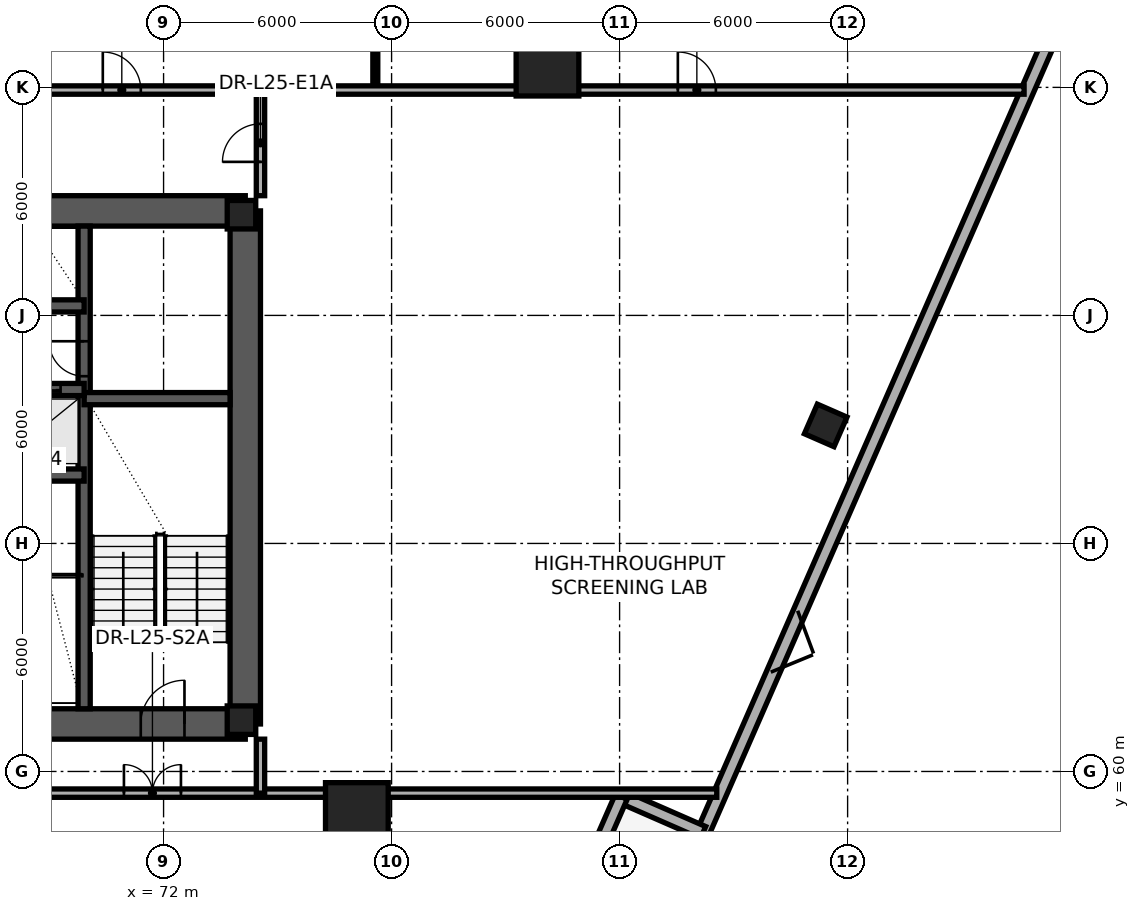
"""IFC4 building model, lengths in metres.
Left out: names, types, materials, properties, quantities, classifications, styles, units other than length and angle.
Written with IfcOpenShell. Run it as: python <this file> out.ifc"""

import sys

from ifc_helpers import new_model, si_unit, direction, frame, frame_2d, origin, origin_2d, place, context, subcontext, project, spatial, rectangle, extrude, element, fill, save


model = new_model("IFC4")
c1 = context("Model", 3, precision=1e-05, world=origin(), true_north=direction((0.0, 1.0)))
c2 = subcontext(c1, "Body", "Model", "MODEL_VIEW")
j1 = project(units=[si_unit("LENGTHUNIT", "METRE"), si_unit("PLANEANGLEUNIT", "RADIAN")], contexts=[c1])
p1 = place(None, origin())
s1 = spatial("IfcSite", under=j1, at=p1, CompositionType="ELEMENT")
p2 = place(p1, origin())
s2 = spatial("IfcBuilding", under=s1, at=p2, CompositionType="ELEMENT")
p3 = place(p2, frame((0.0, 0.0, 96.9)))
s3 = spatial("IfcBuildingStorey", under=s2, at=p3, CompositionType="ELEMENT", Elevation=96.9)
p4 = place(p3, frame((57.85, 61.25, 0.0), z_axis=(0.0, 0.0, 1.0), x_axis=(1.0, 0.0, 0.0)))
e1 = element("IfcWall", 1, at=p4, inside=s3, PredefinedType="SHEAR", context=c2, shape_type="SweptSolid", body=[
    extrude(rectangle(XDim=16.3, YDim=0.8, at=frame_2d((8.15, 0.0))), origin(), (0.0, 0.0, 1.0), 3.65),
])
p5 = place(p4, frame((1.35, 0.0, 0.0)))
e2 = element("IfcOpeningElement", 2, at=p5, cuts=e1, PredefinedType="OPENING", context=c2, shape_type="SweptSolid", body=[
    extrude(rectangle(XDim=1.15, YDim=2.15, at=frame_2d((0.575, 1.075))), frame((0.0, 0.41, 0.0), z_axis=(0.0, -1.0, 0.0), x_axis=(1.0, 0.0, 0.0)), (0.0, 0.0, 1.0), 0.82),
])
p6 = place(p4, frame((6.1, 0.0, 0.0)))
e3 = element("IfcOpeningElement", 3, at=p6, cuts=e1, PredefinedType="OPENING", context=c2, shape_type="SweptSolid", body=[
    extrude(rectangle(XDim=1.6, YDim=2.15, at=frame_2d((0.8, 1.075))), frame((0.0, 0.41, 0.0), z_axis=(0.0, -1.0, 0.0), x_axis=(1.0, 0.0, 0.0)), (0.0, 0.0, 1.0), 0.82),
])
p7 = place(p4, frame((13.55, 0.0, 0.0)))
e4 = element("IfcOpeningElement", 4, at=p7, cuts=e1, PredefinedType="OPENING", context=c2, shape_type="SweptSolid", body=[
    extrude(rectangle(XDim=1.15, YDim=2.15, at=frame_2d((0.575, 1.075))), frame((0.0, 0.41, 0.0), z_axis=(0.0, -1.0, 0.0), x_axis=(1.0, 0.0, 0.0)), (0.0, 0.0, 1.0), 0.82),
])
p8 = place(p3, frame((74.15, 61.25, 0.0), z_axis=(0.0, 0.0, 1.0), x_axis=(0.0, 1.0, 0.0)))
e5 = element("IfcWall", 5, at=p8, inside=s3, PredefinedType="SHEAR", context=c2, shape_type="SweptSolid", body=[
    extrude(rectangle(XDim=13.5, YDim=0.8, at=frame_2d((6.75, 0.0))), origin(), (0.0, 0.0, 1.0), 3.65),
])
p9 = place(p3, frame((74.15, 74.75, 0.0), z_axis=(0.0, 0.0, 1.0), x_axis=(-1.0, 0.0, 0.0)))
e6 = element("IfcWall", 6, at=p9, inside=s3, PredefinedType="SHEAR", context=c2, shape_type="SweptSolid", body=[
    extrude(rectangle(XDim=7.3, YDim=0.8, at=frame_2d((3.65, 0.0))), origin(), (0.0, 0.0, 1.0), 3.65),
])
p10 = place(p3, frame((69.91, 61.65, 0.0), z_axis=(0.0, 0.0, 1.0), x_axis=(0.0, 1.0, 0.0)))
e7 = element("IfcWall", 7, at=p10, inside=s3, PredefinedType="SHEAR", context=c2, shape_type="SweptSolid", body=[
    extrude(rectangle(XDim=12.7, YDim=0.32, at=frame_2d((6.35, 0.0))), origin(), (0.0, 0.0, 1.0), 3.65),
])
p11 = place(p10, frame((8.75, 0.0, 0.0)))
e8 = element("IfcOpeningElement", 8, at=p11, cuts=e7, PredefinedType="OPENING", context=c2, shape_type="SweptSolid", body=[
    extrude(rectangle(XDim=0.92, YDim=2.05, at=frame_2d((0.46, 1.025))), frame((0.0, 0.17, 0.0), z_axis=(0.0, -1.0, 0.0), x_axis=(1.0, 0.0, 0.0)), (0.0, 0.0, 1.0), 0.34),
])
p12 = place(p3, frame((69.91, 69.81, 0.0), z_axis=(0.0, 0.0, 1.0), x_axis=(1.0, 0.0, 0.0)))
e9 = element("IfcWall", 9, at=p12, inside=s3, PredefinedType="SHEAR", context=c2, shape_type="SweptSolid", body=[
    extrude(rectangle(XDim=3.84, YDim=0.32, at=frame_2d((1.92, 0.0))), origin(), (0.0, 0.0, 1.0), 3.65),
])
p13 = place(p3, frame((62.09, 67.8, 0.0), z_axis=(0.0, 0.0, 1.0), x_axis=(1.0, 0.0, 0.0)))
e10 = element("IfcWall", 10, at=p13, inside=s3, PredefinedType="SHEAR", context=c2, shape_type="SweptSolid", body=[
    extrude(rectangle(XDim=7.82, YDim=0.32, at=frame_2d((3.91, 0.0))), origin(), (0.0, 0.0, 1.0), 3.65),
])
p14 = place(p3, frame((62.09, 70.05, 0.0), z_axis=(0.0, 0.0, 1.0), x_axis=(1.0, 0.0, 0.0)))
e11 = element("IfcWall", 11, at=p14, inside=s3, PredefinedType="SHEAR", context=c2, shape_type="SweptSolid", body=[
    extrude(rectangle(XDim=7.82, YDim=0.32, at=frame_2d((3.91, 0.0))), origin(), (0.0, 0.0, 1.0), 3.65),
])
p15 = place(p14, frame((1.8, 0.0, 0.0)))
e12 = element("IfcOpeningElement", 12, at=p15, cuts=e11, PredefinedType="OPENING", context=c2, shape_type="SweptSolid", body=[
    extrude(rectangle(XDim=1.05, YDim=2.15, at=frame_2d((0.525, 1.075))), frame((0.0, 0.17, 0.0), z_axis=(0.0, -1.0, 0.0), x_axis=(1.0, 0.0, 0.0)), (0.0, 0.0, 1.0), 0.34),
])
p16 = place(p14, frame((6.1, 0.0, 0.0)))
e13 = element("IfcOpeningElement", 13, at=p16, cuts=e11, PredefinedType="OPENING", context=c2, shape_type="SweptSolid", body=[
    extrude(rectangle(XDim=1.1, YDim=2.2, at=frame_2d((0.55, 1.1))), frame((0.0, 0.17, 0.0), z_axis=(0.0, -1.0, 0.0), x_axis=(1.0, 0.0, 0.0)), (0.0, 0.0, 1.0), 0.34),
])
p17 = place(p3, frame((66.85, 72.25, 0.0), z_axis=(0.0, 0.0, 1.0), x_axis=(1.0, 0.0, 0.0)))
e14 = element("IfcWall", 14, at=p17, inside=s3, PredefinedType="SHEAR", context=c2, shape_type="SweptSolid", body=[
    extrude(rectangle(XDim=3.06, YDim=0.32, at=frame_2d((1.53, 0.0))), origin(), (0.0, 0.0, 1.0), 3.65),
])
for number, where, z_axis, x_axis in (
    (15, (74.05, 61.35, 0.0), (0.0, 0.0, 1.0), (1.0, 0.0, 0.0)),
    (16, (74.05, 74.65, 0.0), (0.0, 0.0, 1.0), (1.0, 0.0, 0.0)),
):
    element("IfcColumn", number, at=place(p3, frame(where, z_axis=z_axis, x_axis=x_axis)), inside=s3, PredefinedType="COLUMN", context=c2, shape_type="SweptSolid", body=[
        extrude(rectangle(XDim=0.75, YDim=0.75, at=origin_2d()), origin(), (0.0, 0.0, 1.0), 3.65),
    ])
for number, where, z_axis, x_axis in (
    (17, (82.102, 78.599, 0.0), (0.0, 0.0, 1.0), (1.0, 0.0, 0.0)),
    (18, (77.086, 58.88, 0.0), (0.0, 0.0, 1.0), (1.0, 0.0, 0.0)),
):
    element("IfcColumn", number, at=place(p3, frame(where, z_axis=z_axis, x_axis=x_axis)), inside=s3, PredefinedType="COLUMN", context=c2, shape_type="SweptSolid", body=[
        extrude(rectangle(XDim=1.65, YDim=1.65, at=origin_2d()), origin(), (0.0, 0.0, 1.0), 3.65),
    ])
p18 = place(p3, frame((89.494, 69.115, 0.003), z_axis=(-0.039229493406, -0.00569028488, 0.999214024874), x_axis=(0.963587524212, -0.264914672989, 0.036322158782)))
e19 = element("IfcColumn", 19, at=p18, inside=s3, PredefinedType="COLUMN", context=c2, shape_type="SweptSolid", body=[
    extrude(rectangle(XDim=0.85, YDim=0.85, at=origin_2d()), origin(), (0.0, 0.0, 1.0), 3.647),
])
p19 = place(p3, frame((96.984, 83.071, 0.0), z_axis=(0.0, 0.0, 1.0), x_axis=(-0.400539645754, -0.916279429093, 0.0)))
e20 = element("IfcWall", 20, at=p19, inside=s3, PredefinedType="STANDARD", context=c2, shape_type="SweptSolid", body=[
    extrude(rectangle(XDim=26.93, YDim=0.34, at=frame_2d((13.465, 0.0))), origin(), (0.0, 0.0, 1.0), 0.85),
])
p20 = place(p3, frame((86.198, 58.396, 0.0), z_axis=(0.0, 0.0, 1.0), x_axis=(-0.916262209943, 0.400579034188, 0.0)))
e21 = element("IfcWall", 21, at=p20, inside=s3, PredefinedType="STANDARD", context=c2, shape_type="SweptSolid", body=[
    extrude(rectangle(XDim=2.35, YDim=0.34, at=frame_2d((1.175, 0.0))), origin(), (0.0, 0.0, 1.0), 2.505),
])
p21 = place(p3, frame((84.044, 59.337, 0.0), z_axis=(0.0, 0.0, 1.0), x_axis=(-0.400536170639, -0.916280948187, 0.0)))
e22 = element("IfcWall", 22, at=p21, inside=s3, PredefinedType="STANDARD", context=c2, shape_type="SweptSolid", body=[
    extrude(rectangle(XDim=11.6, YDim=0.34, at=frame_2d((5.8, 0.0))), origin(), (0.0, 0.0, 1.0), 2.855),
])
p22 = place(p21, frame((9.05, 0.0, 0.0)))
e23 = element("IfcOpeningElement", 23, at=p22, cuts=e22, PredefinedType="OPENING", context=c2, shape_type="SweptSolid", body=[
    extrude(rectangle(XDim=1.9, YDim=2.3, at=frame_2d((0.95, 1.15))), frame((0.0, 0.18, 0.0), z_axis=(0.0, -1.0, 0.0), x_axis=(1.0, 0.0, 0.0)), (0.0, 0.0, 1.0), 0.36),
])
p23 = place(p3, frame((77.572, 77.93, 0.0), z_axis=(0.0, 0.0, 1.0), x_axis=(0.0, 1.0, 0.0)))
e24 = element("IfcWall", 24, at=p23, inside=s3, PredefinedType="PARTITIONING", context=c2, shape_type="SweptSolid", body=[
    extrude(rectangle(XDim=12.339, YDim=0.13, at=frame_2d((6.169, 0.0))), origin(), (0.0, 0.0, 1.0), 2.505),
])
p24 = place(p3, frame((37.356, 77.93, 0.0), z_axis=(0.0, 0.0, 1.0), x_axis=(1.0, 0.0, 0.0)))
e25 = element("IfcWall", 25, at=p24, inside=s3, PredefinedType="PARTITIONING", context=c2, shape_type="SweptSolid", body=[
    extrude(rectangle(XDim=57.288, YDim=0.22, at=frame_2d((28.644, 0.0))), origin(), (0.0, 0.0, 1.0), 2.505),
])
p25 = place(p24, frame((22.204, 0.0, 0.0)))
e26 = element("IfcOpeningElement", 26, at=p25, cuts=e25, PredefinedType="OPENING", context=c2, shape_type="SweptSolid", body=[
    extrude(rectangle(XDim=0.98, YDim=2.1, at=frame_2d((0.49, 1.05))), frame((0.0, 0.12, 0.0), z_axis=(0.0, -1.0, 0.0), x_axis=(1.0, 0.0, 0.0)), (0.0, 0.0, 1.0), 0.24),
])
p26 = place(p24, frame((25.029, 0.0, 0.0)))
e27 = element("IfcOpeningElement", 27, at=p26, cuts=e25, PredefinedType="OPENING", context=c2, shape_type="SweptSolid", body=[
    extrude(rectangle(XDim=0.98, YDim=2.1, at=frame_2d((0.49, 1.05))), frame((0.0, 0.12, 0.0), z_axis=(0.0, -1.0, 0.0), x_axis=(1.0, 0.0, 0.0)), (0.0, 0.0, 1.0), 0.24),
])
p27 = place(p24, frame((9.311, 0.0, 0.0)))
e28 = element("IfcOpeningElement", 28, at=p27, cuts=e25, PredefinedType="OPENING", context=c2, shape_type="SweptSolid", body=[
    extrude(rectangle(XDim=1.0, YDim=2.1, at=frame_2d((0.5, 1.05))), frame((0.0, 0.12, 0.0), z_axis=(0.0, -1.0, 0.0), x_axis=(1.0, 0.0, 0.0)), (0.0, 0.0, 1.0), 0.24),
])
p28 = place(p24, frame((33.045, 0.0, 0.0)))
e29 = element("IfcOpeningElement", 29, at=p28, cuts=e25, PredefinedType="OPENING", context=c2, shape_type="SweptSolid", body=[
    extrude(rectangle(XDim=1.0, YDim=2.1, at=frame_2d((0.5, 1.05))), frame((0.0, 0.12, 0.0), z_axis=(0.0, -1.0, 0.0), x_axis=(1.0, 0.0, 0.0)), (0.0, 0.0, 1.0), 0.24),
])
p29 = place(p24, frame((48.177, 0.0, 0.0)))
e30 = element("IfcOpeningElement", 30, at=p29, cuts=e25, PredefinedType="OPENING", context=c2, shape_type="SweptSolid", body=[
    extrude(rectangle(XDim=1.0, YDim=2.1, at=frame_2d((0.5, 1.05))), frame((0.0, 0.12, 0.0), z_axis=(0.0, -1.0, 0.0), x_axis=(1.0, 0.0, 0.0)), (0.0, 0.0, 1.0), 0.24),
])
p30 = place(p3, frame((45.443, 59.43, 0.0), z_axis=(0.0, 0.0, 1.0), x_axis=(1.0, 0.0, 0.0)))
e31 = element("IfcWall", 31, at=p30, inside=s3, PredefinedType="PARTITIONING", context=c2, shape_type="SweptSolid", body=[
    extrude(rectangle(XDim=41.114, YDim=0.22, at=frame_2d((20.557, 0.0))), origin(), (0.0, 0.0, 1.0), 2.505),
])
p31 = place(p30, frame((6.376, 0.0, 0.0)))
e32 = element("IfcOpeningElement", 32, at=p31, cuts=e31, PredefinedType="OPENING", context=c2, shape_type="SweptSolid", body=[
    extrude(rectangle(XDim=1.5, YDim=2.2, at=frame_2d((0.75, 1.1))), frame((0.0, 0.12, 0.0), z_axis=(0.0, -1.0, 0.0), x_axis=(1.0, 0.0, 0.0)), (0.0, 0.0, 1.0), 0.24),
])
p32 = place(p30, frame((25.514, 0.0, 0.0)))
e33 = element("IfcOpeningElement", 33, at=p32, cuts=e31, PredefinedType="OPENING", context=c2, shape_type="SweptSolid", body=[
    extrude(rectangle(XDim=1.5, YDim=2.2, at=frame_2d((0.75, 1.1))), frame((0.0, 0.12, 0.0), z_axis=(0.0, -1.0, 0.0), x_axis=(1.0, 0.0, 0.0)), (0.0, 0.0, 1.0), 0.24),
])
p33 = place(p3, frame((74.55, 75.15, 0.0), z_axis=(0.0, 0.0, 1.0), x_axis=(0.0, 1.0, 0.0)))
e34 = element("IfcWall", 34, at=p33, inside=s3, PredefinedType="PARTITIONING", context=c2, shape_type="SweptSolid", body=[
    extrude(rectangle(XDim=2.78, YDim=0.22, at=frame_2d((1.39, 0.0))), origin(), (0.0, 0.0, 1.0), 3.375),
])
p34 = place(p33, frame((0.89, 0.0, 0.0)))
e35 = element("IfcOpeningElement", 35, at=p34, cuts=e34, PredefinedType="OPENING", context=c2, shape_type="SweptSolid", body=[
    extrude(rectangle(XDim=1.0, YDim=2.1, at=frame_2d((0.5, 1.05))), frame((0.0, 0.12, 0.0), z_axis=(0.0, -1.0, 0.0), x_axis=(1.0, 0.0, 0.0)), (0.0, 0.0, 1.0), 0.24),
])
p35 = place(p3, frame((74.55, 59.43, 0.0), z_axis=(0.0, 0.0, 1.0), x_axis=(0.0, 1.0, 0.0)))
e36 = element("IfcWall", 36, at=p35, inside=s3, PredefinedType="PARTITIONING", context=c2, shape_type="SweptSolid", body=[
    extrude(rectangle(XDim=1.42, YDim=0.22, at=frame_2d((0.71, 0.0))), origin(), (0.0, 0.0, 1.0), 2.655),
])
p36 = place(p16, origin())
e37 = element("IfcDoor", 37, at=p36, inside=s3, OperationType="SLIDING_TO_LEFT", PredefinedType="DOOR", context=c2, shape_type="SweptSolid", body=[
    extrude(rectangle(XDim=1.1, YDim=2.2, at=frame_2d((0.55, 1.1))), frame((0.0, 0.025, 0.0), z_axis=(0.0, -1.0, 0.0), x_axis=(1.0, 0.0, 0.0)), (0.0, 0.0, 1.0), 0.05),
])
fill(e13, e37)
p37 = place(p7, origin())
e38 = element("IfcDoor", 38, at=p37, inside=s3, OperationType="SINGLE_SWING_RIGHT", PredefinedType="DOOR", context=c2, shape_type="SweptSolid", body=[
    extrude(rectangle(XDim=1.15, YDim=2.15, at=frame_2d((0.575, 1.075))), frame((0.0, 0.025, 0.0), z_axis=(0.0, -1.0, 0.0), x_axis=(1.0, 0.0, 0.0)), (0.0, 0.0, 1.0), 0.05),
])
fill(e4, e38)
p38 = place(p11, origin())
e39 = element("IfcDoor", 39, at=p38, inside=s3, OperationType="SINGLE_SWING_RIGHT", PredefinedType="DOOR", context=c2, shape_type="SweptSolid", body=[
    extrude(rectangle(XDim=0.92, YDim=2.05, at=frame_2d((0.46, 1.025))), frame((0.0, 0.025, 0.0), z_axis=(0.0, -1.0, 0.0), x_axis=(1.0, 0.0, 0.0)), (0.0, 0.0, 1.0), 0.05),
])
fill(e8, e39)
p39 = place(p28, origin())
e40 = element("IfcDoor", 40, at=p39, inside=s3, OperationType="SINGLE_SWING_LEFT", PredefinedType="DOOR", context=c2, shape_type="SweptSolid", body=[
    extrude(rectangle(XDim=1.0, YDim=2.1, at=frame_2d((0.5, 1.05))), frame((0.0, 0.025, 0.0), z_axis=(0.0, -1.0, 0.0), x_axis=(1.0, 0.0, 0.0)), (0.0, 0.0, 1.0), 0.05),
])
fill(e29, e40)
p40 = place(p29, origin())
e41 = element("IfcDoor", 41, at=p40, inside=s3, OperationType="SINGLE_SWING_LEFT", PredefinedType="DOOR", context=c2, shape_type="SweptSolid", body=[
    extrude(rectangle(XDim=1.0, YDim=2.1, at=frame_2d((0.5, 1.05))), frame((0.0, 0.025, 0.0), z_axis=(0.0, -1.0, 0.0), x_axis=(1.0, 0.0, 0.0)), (0.0, 0.0, 1.0), 0.05),
])
fill(e30, e41)
p41 = place(p32, origin())
e42 = element("IfcDoor", 42, at=p41, inside=s3, OperationType="DOUBLE_DOOR_SINGLE_SWING", PredefinedType="DOOR", context=c2, shape_type="SweptSolid", body=[
    extrude(rectangle(XDim=1.5, YDim=2.2, at=frame_2d((0.75, 1.1))), frame((0.0, 0.025, 0.0), z_axis=(0.0, -1.0, 0.0), x_axis=(1.0, 0.0, 0.0)), (0.0, 0.0, 1.0), 0.05),
])
fill(e33, e42)
p42 = place(p34, origin())
e43 = element("IfcDoor", 43, at=p42, inside=s3, OperationType="SINGLE_SWING_LEFT", PredefinedType="DOOR", context=c2, shape_type="SweptSolid", body=[
    extrude(rectangle(XDim=1.0, YDim=2.1, at=frame_2d((0.5, 1.05))), frame((0.0, 0.025, 0.0), z_axis=(0.0, -1.0, 0.0), x_axis=(1.0, 0.0, 0.0)), (0.0, 0.0, 1.0), 0.05),
])
fill(e35, e43)
save(model, sys.argv[1])
